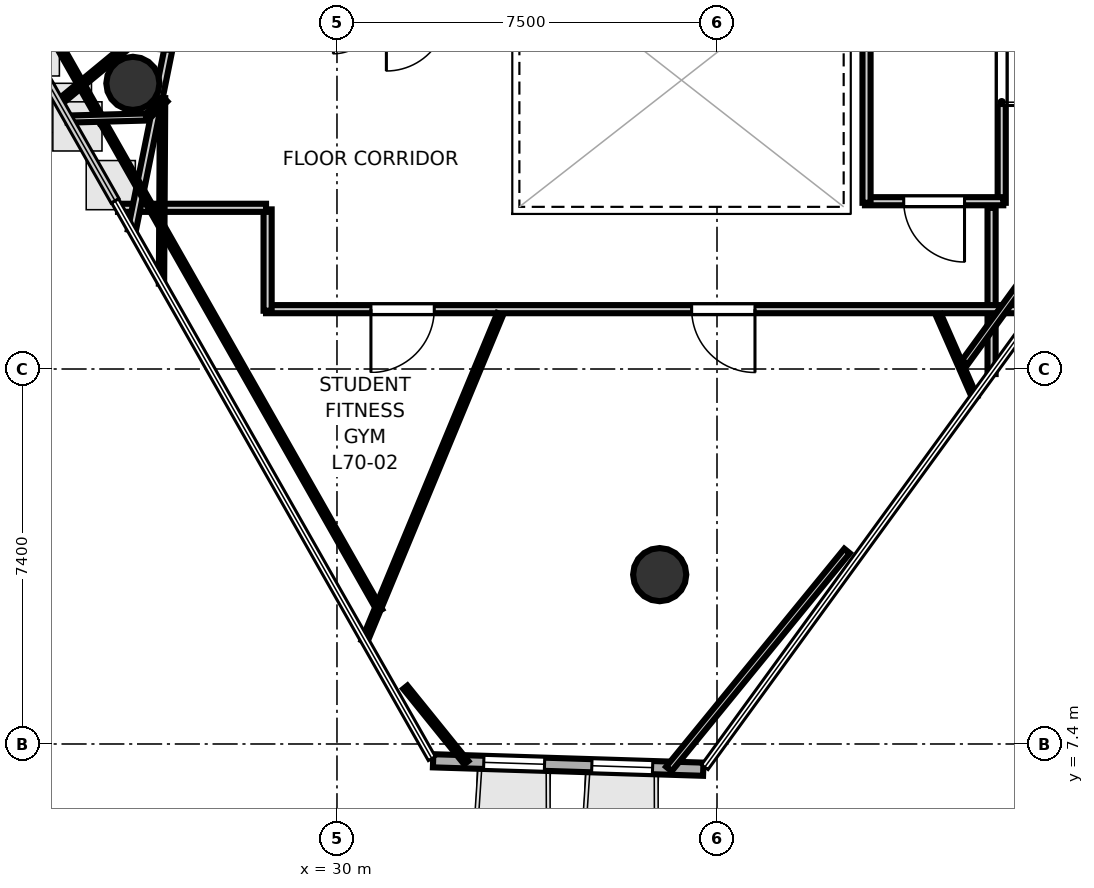
"""IFC4 building model, lengths in metres.
Left out: names, types, materials, properties, quantities, classifications, styles, units other than length and angle.
Written with IfcOpenShell. Run it as: python <this file> out.ifc"""

import sys

from ifc_helpers import new_model, si_unit, direction, frame, frame_2d, origin, origin_2d, place, context, subcontext, project, spatial, rectangle, hollow_circle, extrude, element, fill, save


model = new_model("IFC4")
c1 = context("Model", 3, precision=1e-05, world=origin(), true_north=direction((0.0, 1.0)))
c2 = subcontext(c1, "Body", "Model", "MODEL_VIEW")
j1 = project(units=[si_unit("LENGTHUNIT", "METRE"), si_unit("PLANEANGLEUNIT", "RADIAN")], contexts=[c1])
p1 = place(None, origin())
s1 = spatial("IfcSite", under=j1, at=p1, CompositionType="ELEMENT")
p2 = place(p1, origin())
s2 = spatial("IfcBuilding", under=s1, at=p2, CompositionType="ELEMENT")
p3 = place(p2, frame((0.0, 0.0, 272.3)))
s3 = spatial("IfcBuildingStorey", under=s2, at=p3, CompositionType="ELEMENT", Elevation=272.3)
for number, where, z_axis, x_axis in (
    (1, (25.972, 20.437, 0.0), (0.0, 0.0, 1.0), (1.0, 0.0, 0.0)),
    (2, (36.369, 10.742, 0.0), (0.0, 0.0, 1.0), (1.0, 0.0, 0.0)),
):
    element("IfcColumn", number, at=place(p3, frame(where, z_axis=z_axis, x_axis=x_axis)), inside=s3, PredefinedType="COLUMN", context=c2, shape_type="SweptSolid", body=[
        extrude(hollow_circle(Radius=0.525, WallThickness=0.028, at=origin_2d()), origin(), (0.0, 0.0, 1.0), 3.7),
    ])
p4 = place(p3, frame((31.897, 7.069, 0.0), z_axis=(0.0, 0.0, 1.0), x_axis=(0.999514127971, -0.031169022857, 0.0)))
e3 = element("IfcWall", 3, at=p4, inside=s3, PredefinedType="SOLIDWALL", context=c2, shape_type="SweptSolid", body=[
    extrude(rectangle(XDim=5.334, YDim=0.26, at=frame_2d((2.667, 0.0))), origin(), (0.0, 0.0, 1.0), 3.4),
])
p5 = place(p4, frame((1.0, 0.0, 0.9)))
e4 = element("IfcOpeningElement", 4, at=p5, cuts=e3, PredefinedType="OPENING", context=c2, shape_type="SweptSolid", body=[
    extrude(rectangle(XDim=1.2, YDim=2.0, at=frame_2d((0.6, 1.0))), frame((0.0, 0.14, 0.0), z_axis=(0.0, -1.0, 0.0), x_axis=(1.0, 0.0, 0.0)), (0.0, 0.0, 1.0), 0.28),
])
p6 = place(p4, frame((3.134, 0.0, 0.9)))
e5 = element("IfcOpeningElement", 5, at=p6, cuts=e3, PredefinedType="OPENING", context=c2, shape_type="SweptSolid", body=[
    extrude(rectangle(XDim=1.2, YDim=2.0, at=frame_2d((0.6, 1.0))), frame((0.0, 0.14, 0.0), z_axis=(0.0, -1.0, 0.0), x_axis=(1.0, 0.0, 0.0)), (0.0, 0.0, 1.0), 0.28),
])
p7 = place(p3, frame((43.119, 22.05, 0.0), z_axis=(0.0, 0.0, 1.0), x_axis=(0.0, -1.0, 0.0)))
e6 = element("IfcWall", 6, at=p7, inside=s3, PredefinedType="PARTITIONING", context=c2, shape_type="SweptSolid", body=[
    extrude(rectangle(XDim=3.97, YDim=0.16, at=frame_2d((1.985, 0.0))), origin(), (0.0, 0.0, 1.0), 2.72),
])
p8 = place(p7, frame((0.8, 0.0, 0.0)))
e7 = element("IfcOpeningElement", 7, at=p8, cuts=e6, PredefinedType="OPENING", context=c2, shape_type="SweptSolid", body=[
    extrude(rectangle(XDim=1.25, YDim=2.2, at=frame_2d((0.625, 1.1))), frame((0.0, 0.09, 0.0), z_axis=(0.0, -1.0, 0.0), x_axis=(1.0, 0.0, 0.0)), (0.0, 0.0, 1.0), 0.18),
])
p9 = place(p3, frame((43.15, 18.111, 0.0), z_axis=(0.0, 0.0, 1.0), x_axis=(-1.0, 0.0, 0.0)))
e8 = element("IfcWall", 8, at=p9, inside=s3, PredefinedType="PARTITIONING", context=c2, shape_type="SweptSolid", body=[
    extrude(rectangle(XDim=2.73, YDim=0.16, at=frame_2d((1.365, 0.0))), origin(), (0.0, 0.0, 1.0), 2.72),
])
p10 = place(p9, frame((0.765, 0.0, 0.0)))
e9 = element("IfcOpeningElement", 9, at=p10, cuts=e8, PredefinedType="OPENING", context=c2, shape_type="SweptSolid", body=[
    extrude(rectangle(XDim=1.2, YDim=2.15, at=frame_2d((0.6, 1.075))), frame((0.0, 0.09, 0.0), z_axis=(0.0, -1.0, 0.0), x_axis=(1.0, 0.0, 0.0)), (0.0, 0.0, 1.0), 0.18),
])
p11 = place(p3, frame((40.451, 18.08, 0.0), z_axis=(0.0, 0.0, 1.0), x_axis=(0.0, 1.0, 0.0)))
e10 = element("IfcWall", 10, at=p11, inside=s3, PredefinedType="PARTITIONING", context=c2, shape_type="SweptSolid", body=[
    extrude(rectangle(XDim=3.32, YDim=0.16, at=frame_2d((1.66, 0.0))), origin(), (0.0, 0.0, 1.0), 2.72),
])
p12 = place(p3, frame((42.919, 17.98, 0.0), z_axis=(0.0, 0.0, 1.0), x_axis=(0.0, -1.0, 0.0)))
e11 = element("IfcWall", 11, at=p12, inside=s3, PredefinedType="PARTITIONING", context=c2, shape_type="SweptSolid", body=[
    extrude(rectangle(XDim=3.279, YDim=0.16, at=frame_2d((1.64, 0.0))), origin(), (0.0, 0.0, 1.0), 2.72),
])
p13 = place(p3, frame((43.856, 15.981, 0.0), z_axis=(0.0, 0.0, 1.0), x_axis=(-1.0, 0.0, 0.0)))
e12 = element("IfcWall", 12, at=p13, inside=s3, PredefinedType="PARTITIONING", context=c2, shape_type="SweptSolid", body=[
    extrude(rectangle(XDim=15.256, YDim=0.16, at=frame_2d((7.628, 0.0))), origin(), (0.0, 0.0, 1.0), 2.72),
])
p14 = place(p13, frame((11.936, 0.0, 0.0)))
e13 = element("IfcOpeningElement", 13, at=p14, cuts=e12, PredefinedType="OPENING", context=c2, shape_type="SweptSolid", body=[
    extrude(rectangle(XDim=1.25, YDim=2.2, at=frame_2d((0.625, 1.1))), frame((0.0, 0.09, 0.0), z_axis=(0.0, -1.0, 0.0), x_axis=(1.0, 0.0, 0.0)), (0.0, 0.0, 1.0), 0.18),
])
p15 = place(p13, frame((5.607, 0.0, 0.0)))
e14 = element("IfcOpeningElement", 14, at=p15, cuts=e12, PredefinedType="OPENING", context=c2, shape_type="SweptSolid", body=[
    extrude(rectangle(XDim=1.25, YDim=2.2, at=frame_2d((0.625, 1.1))), frame((0.0, 0.09, 0.0), z_axis=(0.0, -1.0, 0.0), x_axis=(1.0, 0.0, 0.0)), (0.0, 0.0, 1.0), 0.18),
])
p16 = place(p3, frame((28.631, 15.95, 0.0), z_axis=(0.0, 0.0, 1.0), x_axis=(0.0, 1.0, 0.0)))
e15 = element("IfcWall", 15, at=p16, inside=s3, PredefinedType="PARTITIONING", context=c2, shape_type="SweptSolid", body=[
    extrude(rectangle(XDim=2.0, YDim=0.16, at=frame_2d((1.0, 0.0))), origin(), (0.0, 0.0, 1.0), 2.72),
])
p17 = place(p3, frame((28.6, 17.981, 0.0), z_axis=(0.0, 0.0, 1.0), x_axis=(-1.0, 0.0, 0.0)))
e16 = element("IfcWall", 16, at=p17, inside=s3, PredefinedType="PARTITIONING", context=c2, shape_type="SweptSolid", body=[
    extrude(rectangle(XDim=2.922, YDim=0.16, at=frame_2d((1.461, 0.0))), origin(), (0.0, 0.0, 1.0), 2.72),
])
p18 = place(p3, frame((25.951, 17.535, 0.0), z_axis=(0.0, 0.0, 1.0), x_axis=(0.197834740862, 0.980235387704, 0.0)))
e17 = element("IfcWall", 17, at=p18, inside=s3, PredefinedType="PARTITIONING", context=c2, shape_type="SweptSolid", body=[
    extrude(rectangle(XDim=3.688, YDim=0.16, at=frame_2d((1.844, 0.0))), origin(), (0.0, 0.0, 1.0), 2.72),
])
p19 = place(p3, frame((25.814, 21.132, 0.0), z_axis=(0.0, 0.0, 1.0), x_axis=(-0.771280007223, -0.636495994063, 0.0)))
e18 = element("IfcWall", 18, at=p19, inside=s3, PredefinedType="PARTITIONING", context=c2, shape_type="SweptSolid", body=[
    extrude(rectangle(XDim=1.703, YDim=0.12, at=frame_2d((0.851, 0.0))), origin(), (0.0, 0.0, 1.0), 2.72),
])
p20 = place(p3, frame((25.365, 19.684, 0.0), z_axis=(0.0, 0.0, 1.0), x_axis=(-0.493962326572, 0.869483306296, 0.0)))
e19 = element("IfcWall", 19, at=p20, inside=s3, PredefinedType="PARTITIONING", context=c2, shape_type="SweptSolid", body=[
    extrude(rectangle(XDim=9.622, YDim=0.12, at=frame_2d((4.811, 0.0))), origin(), (0.0, 0.0, 1.0), 2.72),
])
p21 = place(p3, frame((25.041, 26.79, 0.0), z_axis=(0.0, 0.0, 1.0), x_axis=(-0.14221349632, -0.989836007359, 0.0)))
e20 = element("IfcWall", 20, at=p21, inside=s3, PredefinedType="PARTITIONING", context=c2, shape_type="SweptSolid", body=[
    extrude(rectangle(XDim=6.17, YDim=0.14, at=frame_2d((3.085, 0.0))), origin(), (0.0, 0.0, 1.0), 2.72),
])
p22 = place(p3, frame((33.221, 15.882, 0.0), z_axis=(0.0, 0.0, 1.0), x_axis=(-0.383419827027, -0.92357416391, 0.0)))
e21 = element("IfcWall", 21, at=p22, inside=s3, PredefinedType="PARTITIONING", context=c2, shape_type="SweptSolid", body=[
    extrude(rectangle(XDim=6.991, YDim=0.12, at=frame_2d((3.495, 0.0))), origin(), (0.0, 0.0, 1.0), 2.72),
])
p23 = place(p3, frame((30.847, 10.033, 0.0), z_axis=(0.0, 0.0, 1.0), x_axis=(-0.493936675542, 0.869497878407, 0.0)))
e22 = element("IfcWall", 22, at=p23, inside=s3, PredefinedType="PARTITIONING", context=c2, shape_type="SweptSolid", body=[
    extrude(rectangle(XDim=11.015, YDim=0.105, at=frame_2d((5.508, 0.0))), origin(), (0.0, 0.0, 1.0), 2.72),
])
p24 = place(p3, frame((24.683, 19.732, 0.0), z_axis=(0.0, 0.0, 1.0), x_axis=(0.999646809625, 0.026575477556, 0.0)))
e23 = element("IfcWall", 23, at=p24, inside=s3, PredefinedType="PARTITIONING", context=c2, shape_type="SweptSolid", body=[
    extrude(rectangle(XDim=1.552, YDim=0.14, at=frame_2d((0.776, 0.0))), origin(), (0.0, 0.0, 1.0), 2.72),
])
p25 = place(p3, frame((26.256, 19.782, 0.0), z_axis=(0.0, 0.0, 1.0), x_axis=(0.72060446241, 0.693346384396, 0.0)))
e24 = element("IfcWall", 24, at=p25, inside=s3, PredefinedType="PARTITIONING", context=c2, shape_type="SweptSolid", body=[
    extrude(rectangle(XDim=0.493, YDim=0.12, at=frame_2d((0.246, 0.0))), origin(), (0.0, 0.0, 1.0), 2.72),
])
p26 = place(p3, frame((26.558, 20.146, 0.0), z_axis=(0.0, 0.0, 1.0), x_axis=(-0.005868521817, -0.999982780078, 0.0)))
e25 = element("IfcWall", 25, at=p26, inside=s3, PredefinedType="PARTITIONING", context=c2, shape_type="SweptSolid", body=[
    extrude(rectangle(XDim=3.661, YDim=0.105, at=frame_2d((1.831, 0.0))), origin(), (0.0, 0.0, 1.0), 2.72),
])
p27 = place(p3, frame((41.876, 15.857, 0.0), z_axis=(0.0, 0.0, 1.0), x_axis=(0.402142340912, -0.915577160946, 0.0)))
e26 = element("IfcWall", 26, at=p27, inside=s3, PredefinedType="PARTITIONING", context=c2, shape_type="SweptSolid", body=[
    extrude(rectangle(XDim=1.77, YDim=0.105, at=frame_2d((0.885, 0.0))), origin(), (0.0, 0.0, 1.0), 2.72),
])
p28 = place(p3, frame((40.066, 11.209, 0.0), z_axis=(0.0, 0.0, 1.0), x_axis=(-0.632811759481, -0.774305674177, 0.0)))
e27 = element("IfcWall", 27, at=p28, inside=s3, PredefinedType="PARTITIONING", context=c2, shape_type="SweptSolid", body=[
    extrude(rectangle(XDim=5.556, YDim=0.14, at=frame_2d((2.778, 0.0))), origin(), (0.0, 0.0, 1.0), 2.72),
])
p29 = place(p3, frame((32.552, 7.031, 0.0), z_axis=(0.0, 0.0, 1.0), x_axis=(-0.628607259806, 0.777722902401, 0.0)))
e28 = element("IfcWall", 28, at=p29, inside=s3, PredefinedType="PARTITIONING", context=c2, shape_type="SweptSolid", body=[
    extrude(rectangle(XDim=1.914, YDim=0.105, at=frame_2d((0.957, 0.0))), origin(), (0.0, 0.0, 1.0), 2.72),
])
p30 = place(p3, frame((46.513, 20.596, 0.0), z_axis=(0.0, 0.0, 1.0), x_axis=(-0.588445207011, -0.808537097693, 0.0)))
e29 = element("IfcWall", 29, at=p30, inside=s3, PredefinedType="PARTITIONING", context=c2, shape_type="SweptSolid", body=[
    extrude(rectangle(XDim=7.005, YDim=0.14, at=frame_2d((3.502, 0.0))), origin(), (0.0, 0.0, 1.0), 2.72),
])
p31 = place(p10, origin())
e30 = element("IfcDoor", 30, at=p31, inside=s3, OperationType="SINGLE_SWING_LEFT", PredefinedType="DOOR", context=c2, shape_type="SweptSolid", body=[
    extrude(rectangle(XDim=1.2, YDim=2.15, at=frame_2d((0.6, 1.075))), frame((0.0, 0.025, 0.0), z_axis=(0.0, -1.0, 0.0), x_axis=(1.0, 0.0, 0.0)), (0.0, 0.0, 1.0), 0.05),
])
fill(e9, e30)
p32 = place(p14, origin())
e31 = element("IfcDoor", 31, at=p32, inside=s3, OperationType="SINGLE_SWING_RIGHT", PredefinedType="DOOR", context=c2, shape_type="SweptSolid", body=[
    extrude(rectangle(XDim=1.25, YDim=2.2, at=frame_2d((0.625, 1.1))), frame((0.0, 0.025, 0.0), z_axis=(0.0, -1.0, 0.0), x_axis=(1.0, 0.0, 0.0)), (0.0, 0.0, 1.0), 0.05),
])
fill(e13, e31)
p33 = place(p15, origin())
e32 = element("IfcDoor", 32, at=p33, inside=s3, OperationType="SINGLE_SWING_LEFT", PredefinedType="DOOR", context=c2, shape_type="SweptSolid", body=[
    extrude(rectangle(XDim=1.25, YDim=2.2, at=frame_2d((0.625, 1.1))), frame((0.0, 0.025, 0.0), z_axis=(0.0, -1.0, 0.0), x_axis=(1.0, 0.0, 0.0)), (0.0, 0.0, 1.0), 0.05),
])
fill(e14, e32)
p34 = place(p8, origin())
e33 = element("IfcDoor", 33, at=p34, inside=s3, OperationType="SINGLE_SWING_RIGHT", PredefinedType="DOOR", context=c2, shape_type="SweptSolid", body=[
    extrude(rectangle(XDim=1.25, YDim=2.2, at=frame_2d((0.625, 1.1))), frame((0.0, 0.025, 0.0), z_axis=(0.0, -1.0, 0.0), x_axis=(1.0, 0.0, 0.0)), (0.0, 0.0, 1.0), 0.05),
])
fill(e7, e33)
p35 = place(p5, origin())
e34 = element("IfcWindow", 34, at=p35, inside=s3, PartitioningType="SINGLE_PANEL", PredefinedType="WINDOW", context=c2, shape_type="SweptSolid", body=[
    extrude(rectangle(XDim=1.2, YDim=2.0, at=frame_2d((0.6, 1.0))), frame((0.0, 0.03, 0.0), z_axis=(0.0, -1.0, 0.0), x_axis=(1.0, 0.0, 0.0)), (0.0, 0.0, 1.0), 0.06),
])
fill(e4, e34)
p36 = place(p6, origin())
e35 = element("IfcWindow", 35, at=p36, inside=s3, PartitioningType="SINGLE_PANEL", PredefinedType="WINDOW", context=c2, shape_type="SweptSolid", body=[
    extrude(rectangle(XDim=1.2, YDim=2.0, at=frame_2d((0.6, 1.0))), frame((0.0, 0.03, 0.0), z_axis=(0.0, -1.0, 0.0), x_axis=(1.0, 0.0, 0.0)), (0.0, 0.0, 1.0), 0.06),
])
fill(e5, e35)
save(model, sys.argv[1])
